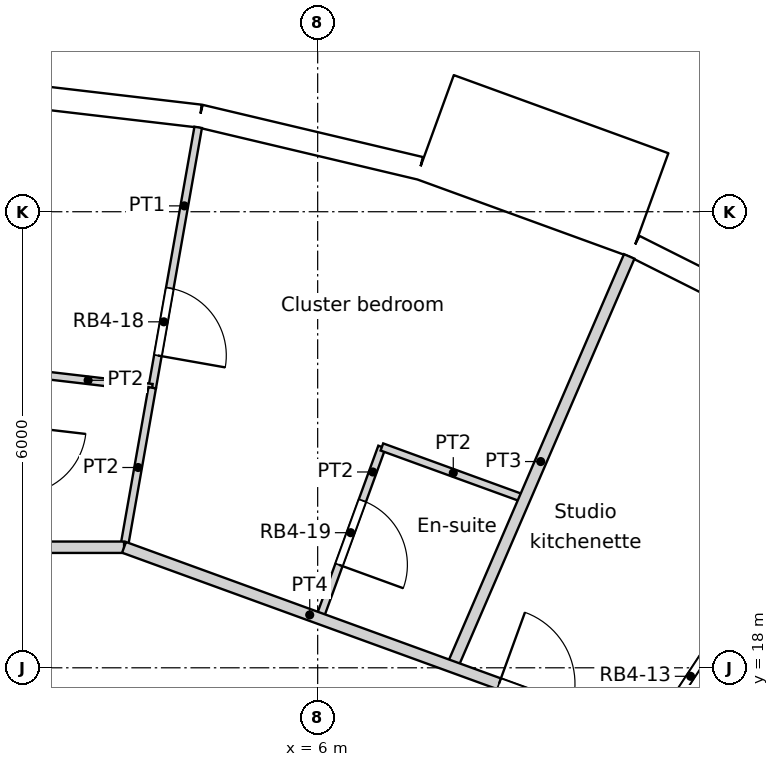
"""IFC4 building model, lengths in metres.
Left out: names, types, materials, properties, quantities, classifications, styles, units other than length and angle.
Written with IfcOpenShell. Run it as: python <this file> out.ifc"""

import sys

from ifc_helpers import new_model, si_unit, direction, frame, frame_2d, origin, origin_2d, place, context, subcontext, project, spatial, rectangle, circle, extrude, element, fill, save


model = new_model("IFC4")
c1 = context("Model", 3, precision=1e-05, world=origin(), true_north=direction((0.0, 1.0)))
c2 = subcontext(c1, "Body", "Model", "MODEL_VIEW")
j1 = project(units=[si_unit("LENGTHUNIT", "METRE"), si_unit("PLANEANGLEUNIT", "RADIAN")], contexts=[c1])
p1 = place(None, origin())
s1 = spatial("IfcSite", under=j1, at=p1, CompositionType="ELEMENT")
p2 = place(p1, origin())
s2 = spatial("IfcBuilding", under=s1, at=p2, CompositionType="ELEMENT")
p3 = place(p2, frame((0.0, 0.0, 158.4)))
s3 = spatial("IfcBuildingStorey", under=s2, at=p3, CompositionType="ELEMENT", Elevation=158.4)
for number, where, z_axis, x_axis in (
    (1, (9.723, 22.54, 0.0), (0.0, 0.0, 1.0), (1.0, 0.0, 0.0)),
    (2, (4.263, 24.175, 0.0), (0.0, 0.0, 1.0), (1.0, 0.0, 0.0)),
):
    element("IfcColumn", number, at=place(p3, frame(where, z_axis=z_axis, x_axis=x_axis)), inside=s3, PredefinedType="COLUMN", context=c2, shape_type="SweptSolid", body=[
        extrude(circle(Radius=0.6, at=origin_2d()), origin(), (0.0, 0.0, 1.0), 3.6),
    ])
p4 = place(p3, frame((6.876, 17.521, 0.0), z_axis=(0.0, 0.0, 1.0), x_axis=(1.0, 0.0, 0.0)))
e3 = element("IfcColumn", 3, at=p4, inside=s3, PredefinedType="COLUMN", context=c2, shape_type="SweptSolid", body=[
    extrude(circle(Radius=0.65, at=origin_2d()), origin(), (0.0, 0.0, 1.0), 3.6),
])
p5 = place(p3, frame((12.824, 22.211, 0.0), z_axis=(0.0, 0.0, 1.0), x_axis=(-0.893637442555, 0.448789618045, 0.0)))
e4 = element("IfcWall", 4, at=p5, inside=s3, PredefinedType="SOLIDWALL", context=c2, shape_type="SweptSolid", body=[
    extrude(rectangle(XDim=2.973, YDim=0.3, at=frame_2d((1.486, 0.0))), origin(), (0.0, 0.0, 1.0), 3.3),
])
p6 = place(p5, frame((1.486, 0.0, 1.55)))
e5 = element("IfcOpeningElement", 5, at=p6, cuts=e4, PredefinedType="OPENING", context=c2, shape_type="SweptSolid", body=[
    extrude(circle(Radius=0.9, at=origin_2d()), frame((0.0, 0.16, 0.0), z_axis=(0.0, -1.0, 0.0), x_axis=(1.0, 0.0, 0.0)), (0.0, 0.0, 1.0), 0.32),
])
p7 = place(p3, frame((10.363, 24.087, -0.3), z_axis=(0.0, 0.0, 1.0), x_axis=(-0.939686455819, 0.342037080957, 0.0)))
e6 = element("IfcWall", 6, at=p7, inside=s3, PredefinedType="ELEMENTEDWALL", context=c2, shape_type="SweptSolid", body=[
    extrude(rectangle(XDim=3.0, YDim=1.45, at=frame_2d((1.5, 0.0))), origin(), (0.0, 0.0, 1.0), 3.6),
])
p8 = place(p7, frame((1.5, 0.0, 1.85)))
e7 = element("IfcOpeningElement", 7, at=p8, cuts=e6, PredefinedType="OPENING", context=c2, shape_type="SweptSolid", body=[
    extrude(circle(Radius=0.9, at=origin_2d()), frame((0.0, 0.735, 0.0), z_axis=(0.0, -1.0, 0.0), x_axis=(1.0, 0.0, 0.0)), (0.0, 0.0, 1.0), 1.47),
])
p9 = place(p3, frame((7.346, 24.572, 0.0), z_axis=(0.0, 0.0, 1.0), x_axis=(-0.973049746156, 0.230595298102, 0.0)))
e8 = element("IfcWall", 8, at=p9, inside=s3, PredefinedType="SOLIDWALL", context=c2, shape_type="SweptSolid", body=[
    extrude(rectangle(XDim=2.973, YDim=0.3, at=frame_2d((1.486, 0.0))), origin(), (0.0, 0.0, 1.0), 3.3),
])
p10 = place(p9, frame((1.486, 0.0, 1.55)))
e9 = element("IfcOpeningElement", 9, at=p10, cuts=e8, PredefinedType="OPENING", context=c2, shape_type="SweptSolid", body=[
    extrude(circle(Radius=0.9, at=origin_2d()), frame((0.0, 0.16, 0.0), z_axis=(0.0, -1.0, 0.0), x_axis=(1.0, 0.0, 0.0)), (0.0, 0.0, 1.0), 0.32),
])
p11 = place(p3, frame((4.454, 25.258, 0.0), z_axis=(0.0, 0.0, 1.0), x_axis=(-0.993235542767, 0.116116995244, 0.0)))
e10 = element("IfcWall", 10, at=p11, inside=s3, PredefinedType="SOLIDWALL", context=c2, shape_type="SweptSolid", body=[
    extrude(rectangle(XDim=2.973, YDim=0.3, at=frame_2d((1.486, 0.0))), origin(), (0.0, 0.0, 1.0), 3.3),
])
p12 = place(p11, frame((1.486, 0.0, 1.55)))
e11 = element("IfcOpeningElement", 11, at=p12, cuts=e10, PredefinedType="OPENING", context=c2, shape_type="SweptSolid", body=[
    extrude(circle(Radius=0.9, at=origin_2d()), frame((0.0, 0.16, 0.0), z_axis=(0.0, -1.0, 0.0), x_axis=(1.0, 0.0, 0.0)), (0.0, 0.0, 1.0), 0.32),
])
p13 = place(p3, frame((3.452, 19.585, 0.0), z_axis=(0.0, 0.0, 1.0), x_axis=(0.939737689664, -0.341896292208, 0.0)))
e12 = element("IfcWall", 12, at=p13, inside=s3, PredefinedType="PARTITIONING", context=c2, shape_type="SweptSolid", body=[
    extrude(rectangle(XDim=6.908, YDim=0.15, at=frame_2d((3.454, 0.0))), origin(), (0.0, 0.0, 1.0), 3.3),
])
p14 = place(p13, frame((5.249, 0.0, 0.0)))
e13 = element("IfcOpeningElement", 13, at=p14, cuts=e12, PredefinedType="OPENING", context=c2, shape_type="SweptSolid", body=[
    extrude(rectangle(XDim=1.0, YDim=2.1, at=frame_2d((0.5, 1.05))), frame((0.0, 0.075, 0.0), z_axis=(0.0, -1.0, 0.0), x_axis=(1.0, 0.0, 0.0)), (0.0, 0.0, 1.0), 0.15),
])
p15 = place(p3, frame((-3.453, 19.586, 0.0), z_axis=(0.0, 0.0, 1.0), x_axis=(1.0, 0.0, 0.0)))
e14 = element("IfcWall", 14, at=p15, inside=s3, PredefinedType="PARTITIONING", context=c2, shape_type="SweptSolid", body=[
    extrude(rectangle(XDim=6.906, YDim=0.15, at=frame_2d((3.453, 0.0))), origin(), (0.0, 0.0, 1.0), 3.3),
])
p16 = place(p15, frame((2.767, 0.0, 0.0)))
e15 = element("IfcOpeningElement", 15, at=p16, cuts=e14, PredefinedType="OPENING", context=c2, shape_type="SweptSolid", body=[
    extrude(rectangle(XDim=1.1, YDim=2.1, at=frame_2d((0.55, 1.05))), frame((0.0, 0.075, 0.0), z_axis=(0.0, -1.0, 0.0), x_axis=(1.0, 0.0, 0.0)), (0.0, 0.0, 1.0), 0.15),
])
p17 = place(p3, frame((10.282, 16.939, 0.0), z_axis=(0.0, 0.0, 1.0), x_axis=(0.549730960803, 0.83534176882, 0.0)))
e16 = element("IfcWall", 16, at=p17, inside=s3, PredefinedType="PARTITIONING", context=c2, shape_type="SweptSolid", body=[
    extrude(rectangle(XDim=2.272, YDim=0.1, at=frame_2d((1.136, 0.0))), origin(), (0.0, 0.0, 1.0), 3.3),
])
p18 = place(p17, frame((0.686, 0.0, 0.0)))
e17 = element("IfcOpeningElement", 17, at=p18, cuts=e16, PredefinedType="OPENING", context=c2, shape_type="SweptSolid", body=[
    extrude(rectangle(XDim=0.9, YDim=2.04, at=frame_2d((0.45, 1.02))), frame((0.0, 0.05, 0.0), z_axis=(0.0, -1.0, 0.0), x_axis=(1.0, 0.0, 0.0)), (0.0, 0.0, 1.0), 0.1),
])
p19 = place(p3, frame((7.77, 18.015, 0.0), z_axis=(0.0, 0.0, 1.0), x_axis=(0.396238716554, 0.918147526002, 0.0)))
e18 = element("IfcWall", 18, at=p19, inside=s3, PredefinedType="PARTITIONING", context=c2, shape_type="SweptSolid", body=[
    extrude(rectangle(XDim=5.879, YDim=0.15, at=frame_2d((2.939, 0.0))), origin(), (0.0, 0.0, 1.0), 3.3),
])
p20 = place(p3, frame((2.137, 21.881, 0.0), z_axis=(0.0, 0.0, 1.0), x_axis=(0.993241601719, -0.11606515676, 0.0)))
e19 = element("IfcWall", 19, at=p20, inside=s3, PredefinedType="PARTITIONING", context=c2, shape_type="SweptSolid", body=[
    extrude(rectangle(XDim=1.698, YDim=0.1, at=frame_2d((0.849, 0.0))), origin(), (0.0, 0.0, 1.0), 3.3),
])
p21 = place(p3, frame((3.823, 21.684, 0.0), z_axis=(0.0, 0.0, 1.0), x_axis=(0.173893421059, 0.984764478499, 0.0)))
e20 = element("IfcWall", 20, at=p21, inside=s3, PredefinedType="PARTITIONING", context=c2, shape_type="SweptSolid", body=[
    extrude(rectangle(XDim=3.479, YDim=0.1, at=frame_2d((1.74, 0.0))), origin(), (0.0, 0.0, 1.0), 3.3),
])
p22 = place(p21, frame((0.431, 0.0, 0.0)))
e21 = element("IfcOpeningElement", 21, at=p22, cuts=e20, PredefinedType="OPENING", context=c2, shape_type="SweptSolid", body=[
    extrude(rectangle(XDim=0.9, YDim=2.1, at=frame_2d((0.45, 1.05))), frame((0.0, 0.05, 0.0), z_axis=(0.0, -1.0, 0.0), x_axis=(1.0, 0.0, 0.0)), (0.0, 0.0, 1.0), 0.1),
])
p23 = place(p3, frame((3.453, 19.586, 0.0), z_axis=(0.0, 0.0, 1.0), x_axis=(0.173719962819, 0.984795092655, 0.0)))
e22 = element("IfcWall", 22, at=p23, inside=s3, PredefinedType="PARTITIONING", context=c2, shape_type="SweptSolid", body=[
    extrude(rectangle(XDim=2.131, YDim=0.1, at=frame_2d((1.065, 0.0))), origin(), (0.0, 0.0, 1.0), 3.3),
])
p24 = place(p3, frame((6.845, 20.905, 0.0), z_axis=(0.0, 0.0, 1.0), x_axis=(0.939757747305, -0.341841156651, 0.0)))
e23 = element("IfcWall", 23, at=p24, inside=s3, PredefinedType="PARTITIONING", context=c2, shape_type="SweptSolid", body=[
    extrude(rectangle(XDim=1.998, YDim=0.1, at=frame_2d((0.999, 0.0))), origin(), (0.0, 0.0, 1.0), 3.3),
])
p25 = place(p3, frame((6.024, 18.65, 0.0), z_axis=(0.0, 0.0, 1.0), x_axis=(0.342110593602, 0.939659694648, 0.0)))
e24 = element("IfcWall", 24, at=p25, inside=s3, PredefinedType="PARTITIONING", context=c2, shape_type="SweptSolid", body=[
    extrude(rectangle(XDim=2.4, YDim=0.1, at=frame_2d((1.2, 0.0))), origin(), (0.0, 0.0, 1.0), 3.3),
])
p26 = place(p25, frame((0.75, 0.0, 0.0)))
e25 = element("IfcOpeningElement", 25, at=p26, cuts=e24, PredefinedType="OPENING", context=c2, shape_type="SweptSolid", body=[
    extrude(rectangle(XDim=0.9, YDim=2.04, at=frame_2d((0.45, 1.02))), frame((0.0, 0.05, 0.0), z_axis=(0.0, -1.0, 0.0), x_axis=(1.0, 0.0, 0.0)), (0.0, 0.0, 1.0), 0.1),
])
p27 = place(p6, origin())
e26 = element("IfcWindow", 26, at=p27, inside=s3, PartitioningType="SINGLE_PANEL", PredefinedType="WINDOW", context=c2, shape_type="SweptSolid", body=[
    extrude(circle(Radius=0.9, at=origin_2d()), frame((0.0, 0.12, 0.0), z_axis=(0.0, -1.0, 0.0), x_axis=(1.0, 0.0, 0.0)), (0.0, 0.0, 1.0), 0.1),
])
fill(e5, e26)
p28 = place(p8, origin())
e27 = element("IfcWindow", 27, at=p28, inside=s3, PartitioningType="SINGLE_PANEL", PredefinedType="WINDOW", context=c2, shape_type="SweptSolid", body=[
    extrude(circle(Radius=0.9, at=origin_2d()), frame((0.0, 0.695, 0.0), z_axis=(0.0, -1.0, 0.0), x_axis=(1.0, 0.0, 0.0)), (0.0, 0.0, 1.0), 0.1),
])
fill(e7, e27)
p29 = place(p10, origin())
e28 = element("IfcWindow", 28, at=p29, inside=s3, PartitioningType="SINGLE_PANEL", PredefinedType="WINDOW", context=c2, shape_type="SweptSolid", body=[
    extrude(circle(Radius=0.9, at=origin_2d()), frame((0.0, 0.12, 0.0), z_axis=(0.0, -1.0, 0.0), x_axis=(1.0, 0.0, 0.0)), (0.0, 0.0, 1.0), 0.1),
])
fill(e9, e28)
p30 = place(p12, origin())
e29 = element("IfcWindow", 29, at=p30, inside=s3, PartitioningType="SINGLE_PANEL", PredefinedType="WINDOW", context=c2, shape_type="SweptSolid", body=[
    extrude(circle(Radius=0.9, at=origin_2d()), frame((0.0, 0.12, 0.0), z_axis=(0.0, -1.0, 0.0), x_axis=(1.0, 0.0, 0.0)), (0.0, 0.0, 1.0), 0.1),
])
fill(e11, e29)
p31 = place(p18, origin())
e30 = element("IfcDoor", 30, at=p31, inside=s3, OperationType="SINGLE_SWING_LEFT", PredefinedType="DOOR", context=c2, shape_type="SweptSolid", body=[
    extrude(rectangle(XDim=0.9, YDim=2.04, at=frame_2d((0.45, 1.02))), frame((0.0, 0.025, 0.0), z_axis=(0.0, -1.0, 0.0), x_axis=(1.0, 0.0, 0.0)), (0.0, 0.0, 1.0), 0.05),
])
fill(e17, e30)
p32 = place(p14, origin())
e31 = element("IfcDoor", 31, at=p32, inside=s3, OperationType="SINGLE_SWING_LEFT", PredefinedType="DOOR", context=c2, shape_type="SweptSolid", body=[
    extrude(rectangle(XDim=1.0, YDim=2.1, at=frame_2d((0.5, 1.05))), frame((0.0, 0.025, 0.0), z_axis=(0.0, -1.0, 0.0), x_axis=(1.0, 0.0, 0.0)), (0.0, 0.0, 1.0), 0.05),
])
fill(e13, e31)
p33 = place(p22, origin())
e32 = element("IfcDoor", 32, at=p33, inside=s3, OperationType="SINGLE_SWING_RIGHT", PredefinedType="DOOR", context=c2, shape_type="SweptSolid", body=[
    extrude(rectangle(XDim=0.9, YDim=2.1, at=frame_2d((0.45, 1.05))), frame((0.0, 0.025, 0.0), z_axis=(0.0, -1.0, 0.0), x_axis=(1.0, 0.0, 0.0)), (0.0, 0.0, 1.0), 0.05),
])
fill(e21, e32)
p34 = place(p26, origin())
e33 = element("IfcDoor", 33, at=p34, inside=s3, OperationType="SINGLE_SWING_RIGHT", PredefinedType="DOOR", context=c2, shape_type="SweptSolid", body=[
    extrude(rectangle(XDim=0.9, YDim=2.04, at=frame_2d((0.45, 1.02))), frame((0.0, 0.025, 0.0), z_axis=(0.0, -1.0, 0.0), x_axis=(1.0, 0.0, 0.0)), (0.0, 0.0, 1.0), 0.05),
])
fill(e25, e33)
save(model, sys.argv[1])
